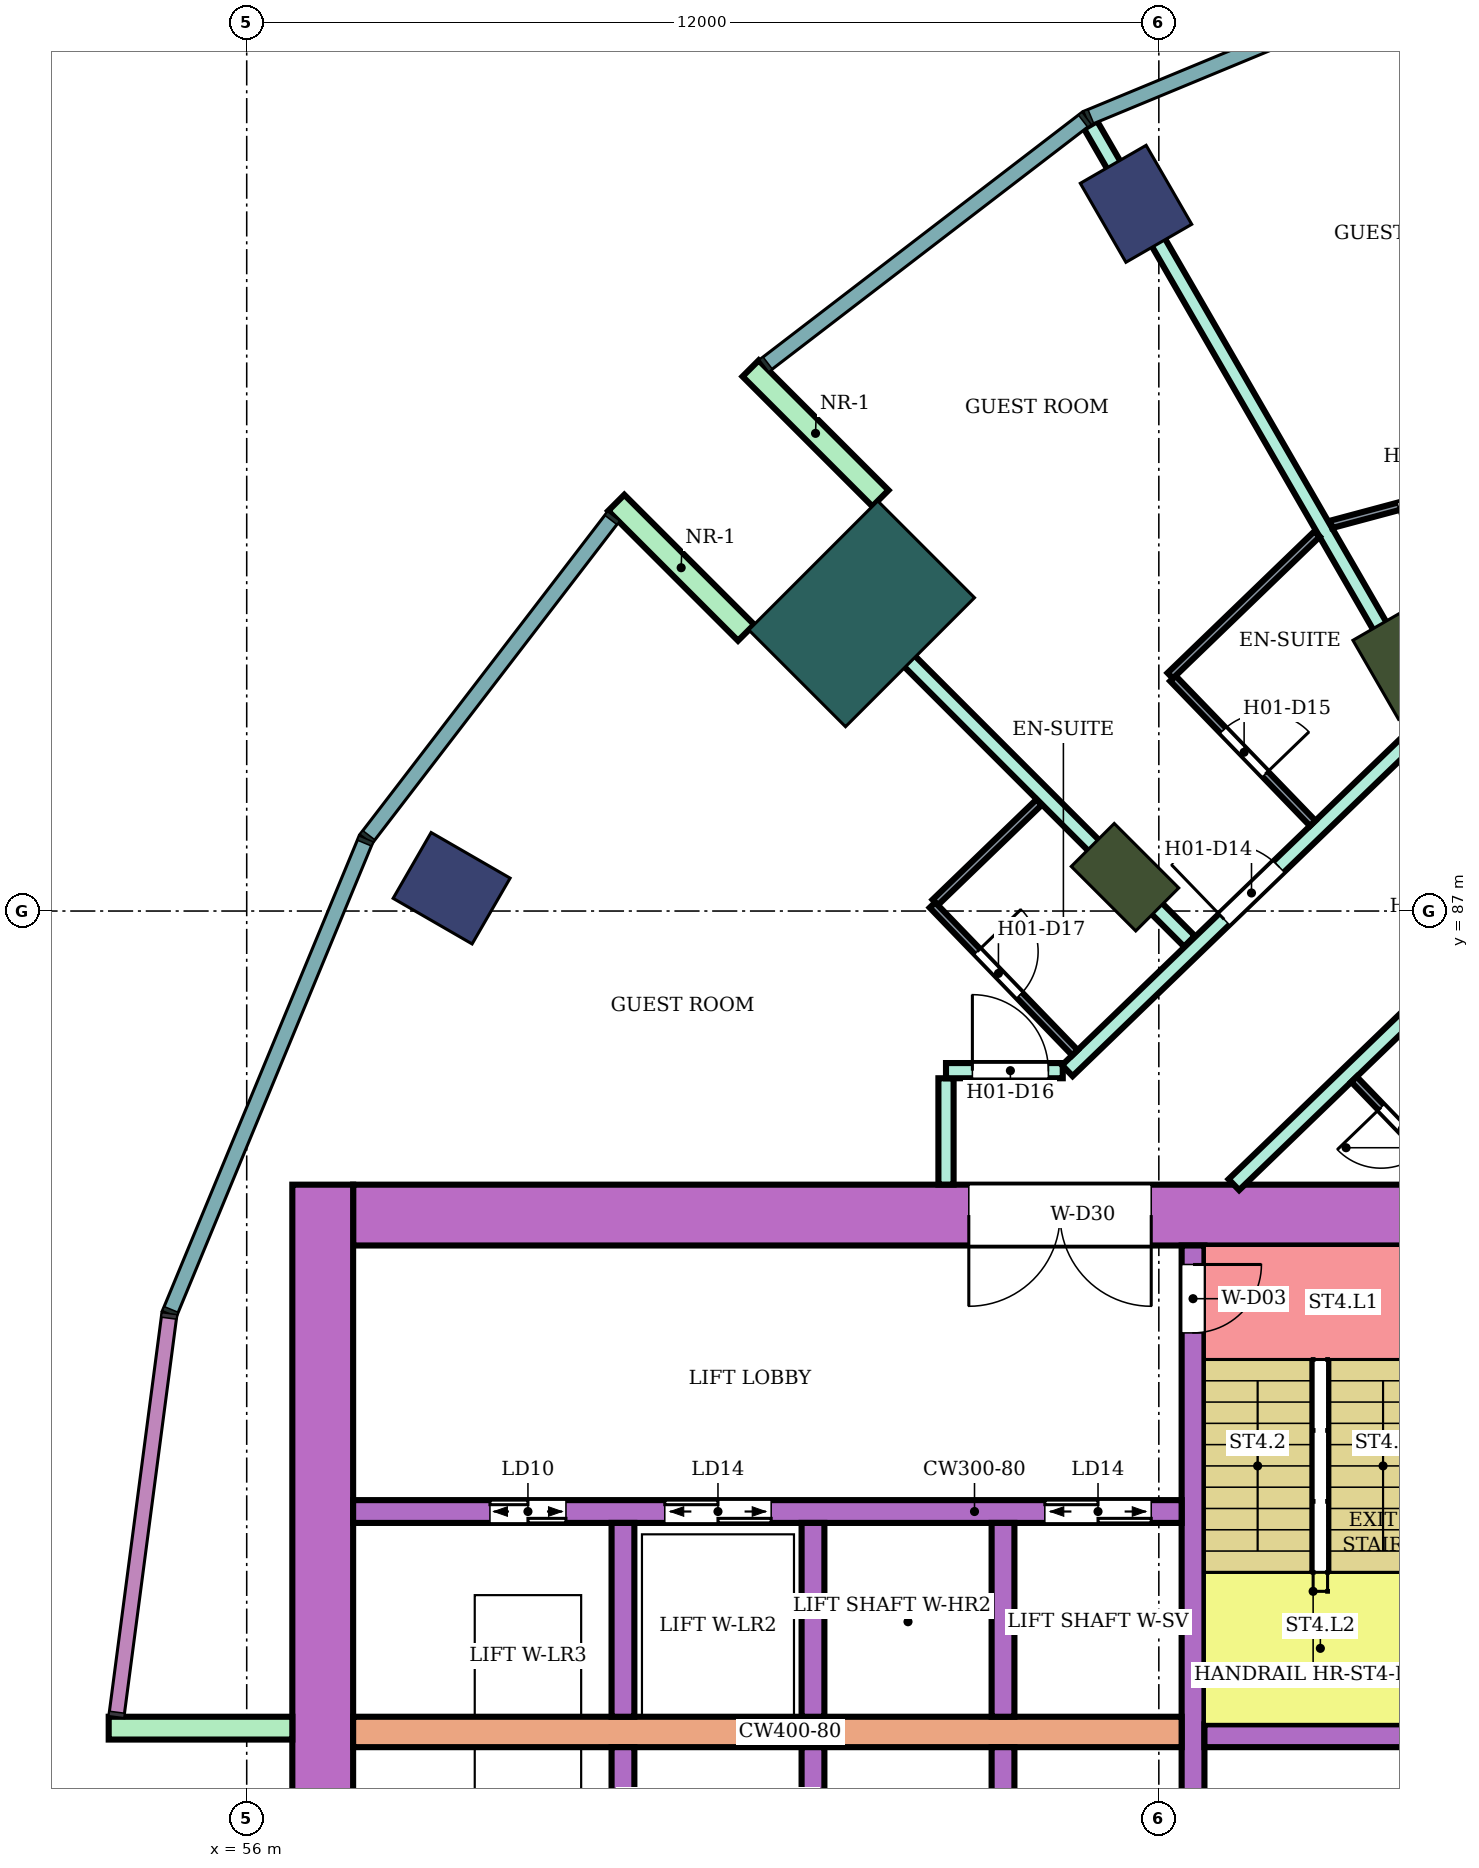
"""IFC4 building model, lengths in metres.
Left out: names, types, materials, properties, quantities, classifications, styles, units other than length and angle.
Written with IfcOpenShell. Run it as: python <this file> out.ifc"""

import sys

from ifc_helpers import new_model, si_unit, direction, frame, frame_2d, origin, origin_2d, place, context, subcontext, project, spatial, rectangle, extrude, element, fill, save


model = new_model("IFC4")
c1 = context("Model", 3, precision=1e-05, world=origin(), true_north=direction((0.0, 1.0)))
c2 = subcontext(c1, "Body", "Model", "MODEL_VIEW")
j1 = project(units=[si_unit("LENGTHUNIT", "METRE"), si_unit("PLANEANGLEUNIT", "RADIAN")], contexts=[c1])
p1 = place(None, origin())
s1 = spatial("IfcSite", under=j1, at=p1, CompositionType="ELEMENT")
p2 = place(p1, origin())
s2 = spatial("IfcBuilding", under=s1, at=p2, CompositionType="ELEMENT")
p3 = place(p2, frame((0.0, 0.0, 32.6)))
s3 = spatial("IfcBuildingStorey", under=s2, at=p3, CompositionType="ELEMENT", Elevation=32.6)
for number, where, z_axis, x_axis in (
    (1, (67.7, 96.304, 0.0), (0.0, 0.0, 1.0), (-0.5, 0.866, 0.0)),
    (2, (58.696, 87.3, 0.0), (0.0, 0.0, 1.0), (-0.866, 0.5, 0.0)),
):
    element("IfcColumn", number, at=place(p3, frame(where, z_axis=z_axis, x_axis=x_axis)), inside=s3, PredefinedType="COLUMN", context=c2, shape_type="SweptSolid", body=[
        extrude(rectangle(XDim=1.2, YDim=1.0, at=origin_2d()), origin(), (0.0, 0.0, 1.0), 3.8),
    ])
for number, where, z_axis, x_axis in (
    (3, (71.2, 90.242, 0.0), (0.0, 0.0, 1.0), (-0.5, 0.866, 0.0)),
    (4, (67.555, 87.445, 0.0), (0.0, 0.0, 1.0), (-0.707, 0.707, 0.0)),
):
    element("IfcColumn", number, at=place(p3, frame(where, z_axis=z_axis, x_axis=x_axis)), inside=s3, PredefinedType="COLUMN", context=c2, shape_type="SweptSolid", body=[
        extrude(rectangle(XDim=1.2, YDim=0.8, at=origin_2d()), origin(), (0.0, 0.0, 1.0), 3.8),
    ])
p4 = place(p3, frame((64.09, 90.91, 0.0), z_axis=(0.0, 0.0, 1.0), x_axis=(-0.707106781187, 0.707106781187, 0.0)))
e5 = element("IfcColumn", 5, at=p4, inside=s3, PredefinedType="COLUMN", context=c2, shape_type="SweptSolid", body=[
    extrude(rectangle(XDim=1.8, YDim=2.4, at=origin_2d()), origin(), (0.0, 0.0, 1.0), 3.8),
])
p5 = place(p3, frame((72.1, 83.0, 0.0), z_axis=(0.0, 0.0, 1.0), x_axis=(-1.0, 0.0, 0.0)))
e6 = element("IfcWall", 6, at=p5, inside=s3, PredefinedType="SHEAR", context=c2, shape_type="SweptSolid", body=[
    extrude(rectangle(XDim=14.7, YDim=0.8, at=frame_2d((7.35, 0.0))), origin(), (0.0, 0.0, 1.0), 3.48),
])
p6 = place(p5, frame((4.2, 0.0, 0.0)))
e7 = element("IfcOpeningElement", 7, at=p6, cuts=e6, PredefinedType="OPENING", context=c2, shape_type="SweptSolid", body=[
    extrude(rectangle(XDim=2.4, YDim=2.4, at=frame_2d((1.2, 1.2))), frame((0.0, 0.41, 0.0), z_axis=(0.0, -1.0, 0.0), x_axis=(1.0, 0.0, 0.0)), (0.0, 0.0, 1.0), 0.82),
])
p7 = place(p3, frame((57.0, 83.4, 0.0), z_axis=(0.0, 0.0, 1.0), x_axis=(0.0, -1.0, 0.0)))
e8 = element("IfcWall", 8, at=p7, inside=s3, PredefinedType="SHEAR", context=c2, shape_type="SweptSolid", body=[
    extrude(rectangle(XDim=16.8, YDim=0.8, at=frame_2d((8.4, 0.0))), origin(), (0.0, 0.0, 1.0), 3.48),
])
p8 = place(p3, frame((68.45, 82.6, 0.0), z_axis=(0.0, 0.0, 1.0), x_axis=(0.0, -1.0, 0.0)))
e9 = element("IfcWall", 9, at=p8, inside=s3, PredefinedType="SHEAR", context=c2, shape_type="SweptSolid", body=[
    extrude(rectangle(XDim=7.6, YDim=0.3, at=frame_2d((3.8, 0.0))), origin(), (0.0, 0.0, 1.0), 3.48),
])
p9 = place(p8, frame((0.25, 0.0, 0.0)))
e10 = element("IfcOpeningElement", 10, at=p9, cuts=e9, PredefinedType="OPENING", context=c2, shape_type="SweptSolid", body=[
    extrude(rectangle(XDim=0.9, YDim=2.1, at=frame_2d((0.45, 1.05))), frame((0.0, 0.16, 0.0), z_axis=(0.0, -1.0, 0.0), x_axis=(1.0, 0.0, 0.0)), (0.0, 0.0, 1.0), 0.32),
])
p10 = place(p3, frame((71.65, 76.15, 0.0), z_axis=(0.0, 0.0, 1.0), x_axis=(-1.0, 0.0, 0.0)))
e11 = element("IfcWall", 11, at=p10, inside=s3, PredefinedType="SHEAR", context=c2, shape_type="SweptSolid", body=[
    extrude(rectangle(XDim=3.05, YDim=0.3, at=frame_2d((1.525, 0.0))), origin(), (0.0, 0.0, 1.0), 3.48),
])
p11 = place(p3, frame((68.3, 76.2, 0.0), z_axis=(0.0, 0.0, 1.0), x_axis=(-1.0, 0.0, 0.0)))
e12 = element("IfcWall", 12, at=p11, inside=s3, PredefinedType="SHEAR", context=c2, shape_type="SweptSolid", body=[
    extrude(rectangle(XDim=10.9, YDim=0.4, at=frame_2d((5.45, 0.0))), origin(), (0.0, 0.0, 1.0), 3.48),
])
p12 = place(p3, frame((68.3, 79.1, 0.0), z_axis=(0.0, 0.0, 1.0), x_axis=(-1.0, 0.0, 0.0)))
e13 = element("IfcWall", 13, at=p12, inside=s3, PredefinedType="SHEAR", context=c2, shape_type="SweptSolid", body=[
    extrude(rectangle(XDim=10.9, YDim=0.3, at=frame_2d((5.45, 0.0))), origin(), (0.0, 0.0, 1.0), 3.48),
])
p13 = place(p12, frame((0.4, 0.0, 0.0)))
e14 = element("IfcOpeningElement", 14, at=p13, cuts=e13, PredefinedType="OPENING", context=c2, shape_type="SweptSolid", body=[
    extrude(rectangle(XDim=1.4, YDim=2.1, at=frame_2d((0.7, 1.05))), frame((0.0, 0.16, 0.0), z_axis=(0.0, -1.0, 0.0), x_axis=(1.0, 0.0, 0.0)), (0.0, 0.0, 1.0), 0.32),
])
p14 = place(p12, frame((5.4, 0.0, 0.0)))
e15 = element("IfcOpeningElement", 15, at=p14, cuts=e13, PredefinedType="OPENING", context=c2, shape_type="SweptSolid", body=[
    extrude(rectangle(XDim=1.4, YDim=2.1, at=frame_2d((0.7, 1.05))), frame((0.0, 0.16, 0.0), z_axis=(0.0, -1.0, 0.0), x_axis=(1.0, 0.0, 0.0)), (0.0, 0.0, 1.0), 0.32),
])
p15 = place(p12, frame((8.1, 0.0, 0.0)))
e16 = element("IfcOpeningElement", 16, at=p15, cuts=e13, PredefinedType="OPENING", context=c2, shape_type="SweptSolid", body=[
    extrude(rectangle(XDim=1.0, YDim=2.1, at=frame_2d((0.5, 1.05))), frame((0.0, 0.16, 0.0), z_axis=(0.0, -1.0, 0.0), x_axis=(1.0, 0.0, 0.0)), (0.0, 0.0, 1.0), 0.32),
])
for number, where, z_axis, x_axis in (
    (17, (65.95, 76.0, 0.0), (0.0, 0.0, 1.0), (0.0, -1.0, 0.0)),
    (18, (63.45, 76.0, 0.0), (0.0, 0.0, 1.0), (0.0, -1.0, 0.0)),
    (19, (60.95, 76.0, 0.0), (0.0, 0.0, 1.0), (0.0, -1.0, 0.0)),
    (20, (65.95, 78.95, 0.0), (0.0, 0.0, 1.0), (0.0, -1.0, 0.0)),
    (21, (63.45, 78.95, 0.0), (0.0, 0.0, 1.0), (0.0, -1.0, 0.0)),
    (22, (60.95, 78.95, 0.0), (0.0, 0.0, 1.0), (0.0, -1.0, 0.0)),
):
    element("IfcWall", number, at=place(p3, frame(where, z_axis=z_axis, x_axis=x_axis)), inside=s3, PredefinedType="SHEAR", context=c2, shape_type="SweptSolid", body=[
        extrude(rectangle(XDim=2.55, YDim=0.3, at=frame_2d((1.275, 0.0))), origin(), (0.0, 0.0, 1.0), 3.48),
    ])
for number, where, z_axis, x_axis in (
    (23, (64.338, 92.43, 0.0), (0.0, 0.0, 1.0), (-0.707, 0.707, 0.0)),
    (24, (62.57, 90.662, 0.0), (0.0, 0.0, 1.0), (-0.707, 0.707, 0.0)),
    (25, (56.6, 76.25, 0.0), (0.0, 0.0, 1.0), (-1.0, 0.0, 0.0)),
):
    element("IfcWall", number, at=place(p3, frame(where, z_axis=z_axis, x_axis=x_axis)), inside=s3, PredefinedType="NOTDEFINED", context=c2, shape_type="SweptSolid", body=[
        extrude(rectangle(XDim=2.416, YDim=0.3, at=frame_2d((1.208, 0.0))), origin(), (0.0, 0.0, 1.0), 3.8),
    ])
p16 = place(p3, frame((63.599, 91.408, 0.0), z_axis=(0.0, 0.0, 1.0), x_axis=(0.706981017422, -0.707232522587, 0.0)))
e26 = element("IfcWall", 26, at=p16, inside=s3, PredefinedType="PARTITIONING", context=c2, shape_type="SweptSolid", body=[
    extrude(rectangle(XDim=6.795, YDim=0.2, at=frame_2d((3.397, 0.0))), origin(), (0.0, 0.0, 1.0), 3.35),
])
p17 = place(p3, frame((65.2, 83.401, 0.0), z_axis=(0.0, 0.0, 1.0), x_axis=(0.0, 1.0, 0.0)))
e27 = element("IfcWall", 27, at=p17, inside=s3, PredefinedType="PARTITIONING", context=c2, shape_type="SweptSolid", body=[
    extrude(rectangle(XDim=1.399, YDim=0.2, at=frame_2d((0.7, 0.0))), origin(), (0.0, 0.0, 1.0), 3.35),
])
p18 = place(p3, frame((65.2, 84.9, 0.0), z_axis=(0.0, 0.0, 1.0), x_axis=(1.0, 0.0, 0.0)))
e28 = element("IfcWall", 28, at=p18, inside=s3, PredefinedType="PARTITIONING", context=c2, shape_type="SweptSolid", body=[
    extrude(rectangle(XDim=1.536, YDim=0.2, at=frame_2d((0.768, 0.0))), origin(), (0.0, 0.0, 1.0), 3.35),
])
p19 = place(p18, frame((0.347, 0.0, 0.0)))
e29 = element("IfcOpeningElement", 29, at=p19, cuts=e28, PredefinedType="OPENING", context=c2, shape_type="SweptSolid", body=[
    extrude(rectangle(XDim=1.0, YDim=2.1, at=frame_2d((0.5, 1.05))), frame((0.0, 0.11, 0.0), z_axis=(0.0, -1.0, 0.0), x_axis=(1.0, 0.0, 0.0)), (0.0, 0.0, 1.0), 0.22),
])
p20 = place(p3, frame((66.796, 84.9, 0.0), z_axis=(0.0, 0.0, 1.0), x_axis=(0.719690131178, 0.694295409092, 0.0)))
e30 = element("IfcWall", 30, at=p20, inside=s3, PredefinedType="PARTITIONING", context=c2, shape_type="SweptSolid", body=[
    extrude(rectangle(XDim=6.585, YDim=0.2, at=frame_2d((3.293, 0.0))), origin(), (0.0, 0.0, 1.0), 3.35),
])
p21 = place(p20, frame((2.867, 0.0, 0.0)))
e31 = element("IfcOpeningElement", 31, at=p21, cuts=e30, PredefinedType="OPENING", context=c2, shape_type="SweptSolid", body=[
    extrude(rectangle(XDim=1.0, YDim=2.1, at=frame_2d((0.5, 1.05))), frame((0.0, 0.11, 0.0), z_axis=(0.0, -1.0, 0.0), x_axis=(1.0, 0.0, 0.0)), (0.0, 0.0, 1.0), 0.22),
])
p22 = place(p3, frame((67.102, 97.342, 0.0), z_axis=(0.0, 0.0, 1.0), x_axis=(0.499944680089, -0.866057340394, 0.0)))
e32 = element("IfcWall", 32, at=p22, inside=s3, PredefinedType="PARTITIONING", context=c2, shape_type="SweptSolid", body=[
    extrude(rectangle(XDim=8.908, YDim=0.2, at=frame_2d((4.454, 0.0))), origin(), (0.0, 0.0, 1.0), 3.35),
])
p23 = place(p3, frame((68.987, 83.4, 0.0), z_axis=(0.0, 0.0, 1.0), x_axis=(0.719591503389, 0.694397629784, 0.0)))
e33 = element("IfcWall", 33, at=p23, inside=s3, PredefinedType="PARTITIONING", context=c2, shape_type="SweptSolid", body=[
    extrude(rectangle(XDim=5.378, YDim=0.2, at=frame_2d((2.689, 0.0))), origin(), (0.0, 0.0, 1.0), 3.35),
])
p24 = place(p23, frame((3.938, 0.0, 0.0)))
e34 = element("IfcOpeningElement", 34, at=p24, cuts=e33, PredefinedType="OPENING", context=c2, shape_type="SweptSolid", body=[
    extrude(rectangle(XDim=1.0, YDim=2.1, at=frame_2d((0.5, 1.05))), frame((0.0, 0.11, 0.0), z_axis=(0.0, -1.0, 0.0), x_axis=(1.0, 0.0, 0.0)), (0.0, 0.0, 1.0), 0.22),
])
p25 = place(p3, frame((65.058, 87.114, 0.0), z_axis=(0.0, 0.0, 1.0), x_axis=(0.719715847356, 0.694268751324, 0.0)))
e35 = element("IfcWall", 35, at=p25, inside=s3, PredefinedType="PARTITIONING", context=c2, shape_type="SweptSolid", body=[
    extrude(rectangle(XDim=1.9, YDim=0.1, at=frame_2d((0.95, 0.0))), origin(), (0.0, 0.0, 1.0), 3.35),
])
p26 = place(p3, frame((65.022, 87.079, 0.0), z_axis=(0.0, 0.0, 1.0), x_axis=(0.694287838235, -0.719697434815, 0.0)))
e36 = element("IfcWall", 36, at=p26, inside=s3, PredefinedType="PARTITIONING", context=c2, shape_type="SweptSolid", body=[
    extrude(rectangle(XDim=2.7, YDim=0.1, at=frame_2d((1.35, 0.0))), origin(), (0.0, 0.0, 1.0), 3.35),
])
p27 = place(p26, frame((0.85, 0.0, 0.0)))
e37 = element("IfcOpeningElement", 37, at=p27, cuts=e36, PredefinedType="OPENING", context=c2, shape_type="SweptSolid", body=[
    extrude(rectangle(XDim=0.8, YDim=2.1, at=frame_2d((0.4, 1.05))), frame((0.0, 0.06, 0.0), z_axis=(0.0, -1.0, 0.0), x_axis=(1.0, 0.0, 0.0)), (0.0, 0.0, 1.0), 0.12),
])
p28 = place(p3, frame((68.185, 90.06, 0.0), z_axis=(0.0, 0.0, 1.0), x_axis=(0.69446127412, -0.719530081892, 0.0)))
e38 = element("IfcWall", 38, at=p28, inside=s3, PredefinedType="PARTITIONING", context=c2, shape_type="SweptSolid", body=[
    extrude(rectangle(XDim=2.649, YDim=0.1, at=frame_2d((1.324, 0.0))), origin(), (0.0, 0.0, 1.0), 3.35),
])
p29 = place(p28, frame((0.95, 0.0, 0.0)))
e39 = element("IfcOpeningElement", 39, at=p29, cuts=e38, PredefinedType="OPENING", context=c2, shape_type="SweptSolid", body=[
    extrude(rectangle(XDim=0.8, YDim=2.1, at=frame_2d((0.4, 1.05))), frame((0.0, 0.06, 0.0), z_axis=(0.0, -1.0, 0.0), x_axis=(1.0, 0.0, 0.0)), (0.0, 0.0, 1.0), 0.12),
])
p30 = place(p3, frame((68.15, 90.096, 0.0), z_axis=(0.0, 0.0, 1.0), x_axis=(0.719669144226, 0.694317163009, 0.0)))
e40 = element("IfcWall", 40, at=p30, inside=s3, PredefinedType="PARTITIONING", context=c2, shape_type="SweptSolid", body=[
    extrude(rectangle(XDim=2.687, YDim=0.1, at=frame_2d((1.343, 0.0))), origin(), (0.0, 0.0, 1.0), 3.35),
])
p31 = place(p3, frame((70.268, 92.087, 0.0), z_axis=(0.0, 0.0, 1.0), x_axis=(0.965931867509, 0.258796497911, 0.0)))
e41 = element("IfcWall", 41, at=p31, inside=s3, PredefinedType="PARTITIONING", context=c2, shape_type="SweptSolid", body=[
    extrude(rectangle(XDim=2.693, YDim=0.1, at=frame_2d((1.347, 0.0))), origin(), (0.0, 0.0, 1.0), 3.35),
])
p32 = place(p31, frame((0.912, 0.0, 0.0)))
e42 = element("IfcOpeningElement", 42, at=p32, cuts=e41, PredefinedType="OPENING", context=c2, shape_type="SweptSolid", body=[
    extrude(rectangle(XDim=0.8, YDim=2.1, at=frame_2d((0.4, 1.05))), frame((0.0, 0.06, 0.0), z_axis=(0.0, -1.0, 0.0), x_axis=(1.0, 0.0, 0.0)), (0.0, 0.0, 1.0), 0.12),
])
p33 = place(p3, frame((70.567, 84.786, 0.0), z_axis=(0.0, 0.0, 1.0), x_axis=(0.694447472534, -0.719543402368, 0.0)))
e43 = element("IfcWall", 43, at=p33, inside=s3, PredefinedType="PARTITIONING", context=c2, shape_type="SweptSolid", body=[
    extrude(rectangle(XDim=1.926, YDim=0.1, at=frame_2d((0.963, 0.0))), origin(), (0.0, 0.0, 1.0), 3.35),
])
p34 = place(p33, frame((0.513, 0.0, 0.0)))
e44 = element("IfcOpeningElement", 44, at=p34, cuts=e43, PredefinedType="OPENING", context=c2, shape_type="SweptSolid", body=[
    extrude(rectangle(XDim=0.8, YDim=2.1, at=frame_2d((0.4, 1.05))), frame((0.0, 0.06, 0.0), z_axis=(0.0, -1.0, 0.0), x_axis=(1.0, 0.0, 0.0)), (0.0, 0.0, 1.0), 0.12),
])
p35 = place(p32, frame((0.8, 0.0, 0.0), z_axis=(0.0, 0.0, 1.0), x_axis=(-1.0, 0.0, 0.0)))
e45 = element("IfcDoor", 45, at=p35, inside=s3, OperationType="SINGLE_SWING_RIGHT", PredefinedType="DOOR", context=c2, shape_type="SweptSolid", body=[
    extrude(rectangle(XDim=0.8, YDim=2.1, at=frame_2d((0.4, 1.05))), frame((0.0, 0.025, 0.0), z_axis=(0.0, -1.0, 0.0), x_axis=(1.0, 0.0, 0.0)), (0.0, 0.0, 1.0), 0.05),
])
fill(e42, e45)
p36 = place(p21, origin())
e46 = element("IfcDoor", 46, at=p36, inside=s3, OperationType="SINGLE_SWING_LEFT", PredefinedType="DOOR", context=c2, shape_type="SweptSolid", body=[
    extrude(rectangle(XDim=1.0, YDim=2.1, at=frame_2d((0.5, 1.05))), frame((0.0, 0.025, 0.0), z_axis=(0.0, -1.0, 0.0), x_axis=(1.0, 0.0, 0.0)), (0.0, 0.0, 1.0), 0.05),
])
fill(e31, e46)
p37 = place(p29, origin())
e47 = element("IfcDoor", 47, at=p37, inside=s3, OperationType="SINGLE_SWING_RIGHT", PredefinedType="DOOR", context=c2, shape_type="SweptSolid", body=[
    extrude(rectangle(XDim=0.8, YDim=2.1, at=frame_2d((0.4, 1.05))), frame((0.0, 0.025, 0.0), z_axis=(0.0, -1.0, 0.0), x_axis=(1.0, 0.0, 0.0)), (0.0, 0.0, 1.0), 0.05),
])
fill(e39, e47)
p38 = place(p19, origin())
e48 = element("IfcDoor", 48, at=p38, inside=s3, OperationType="SINGLE_SWING_LEFT", PredefinedType="DOOR", context=c2, shape_type="SweptSolid", body=[
    extrude(rectangle(XDim=1.0, YDim=2.1, at=frame_2d((0.5, 1.05))), frame((0.0, 0.025, 0.0), z_axis=(0.0, -1.0, 0.0), x_axis=(1.0, 0.0, 0.0)), (0.0, 0.0, 1.0), 0.05),
])
fill(e29, e48)
p39 = place(p27, origin())
e49 = element("IfcDoor", 49, at=p39, inside=s3, OperationType="SINGLE_SWING_LEFT", PredefinedType="DOOR", context=c2, shape_type="SweptSolid", body=[
    extrude(rectangle(XDim=0.8, YDim=2.1, at=frame_2d((0.4, 1.05))), frame((0.0, 0.025, 0.0), z_axis=(0.0, -1.0, 0.0), x_axis=(1.0, 0.0, 0.0)), (0.0, 0.0, 1.0), 0.05),
])
fill(e37, e49)
p40 = place(p34, frame((0.8, 0.0, 0.0), z_axis=(0.0, 0.0, 1.0), x_axis=(-1.0, 0.0, 0.0)))
e50 = element("IfcDoor", 50, at=p40, inside=s3, OperationType="SINGLE_SWING_RIGHT", PredefinedType="DOOR", context=c2, shape_type="SweptSolid", body=[
    extrude(rectangle(XDim=0.8, YDim=2.1, at=frame_2d((0.4, 1.05))), frame((0.0, 0.025, 0.0), z_axis=(0.0, -1.0, 0.0), x_axis=(1.0, 0.0, 0.0)), (0.0, 0.0, 1.0), 0.05),
])
fill(e44, e50)
p41 = place(p9, origin())
e51 = element("IfcDoor", 51, at=p41, inside=s3, OperationType="SINGLE_SWING_LEFT", PredefinedType="DOOR", context=c2, shape_type="SweptSolid", body=[
    extrude(rectangle(XDim=0.9, YDim=2.1, at=frame_2d((0.45, 1.05))), frame((0.0, 0.025, 0.0), z_axis=(0.0, -1.0, 0.0), x_axis=(1.0, 0.0, 0.0)), (0.0, 0.0, 1.0), 0.05),
])
fill(e10, e51)
p42 = place(p13, origin())
e52 = element("IfcDoor", 52, at=p42, inside=s3, OperationType="DOUBLE_DOOR_SLIDING", PredefinedType="DOOR", context=c2, shape_type="SweptSolid", body=[
    extrude(rectangle(XDim=1.4, YDim=2.1, at=frame_2d((0.7, 1.05))), frame((0.0, 0.025, 0.0), z_axis=(0.0, -1.0, 0.0), x_axis=(1.0, 0.0, 0.0)), (0.0, 0.0, 1.0), 0.05),
])
fill(e14, e52)
p43 = place(p14, origin())
e53 = element("IfcDoor", 53, at=p43, inside=s3, OperationType="DOUBLE_DOOR_SLIDING", PredefinedType="DOOR", context=c2, shape_type="SweptSolid", body=[
    extrude(rectangle(XDim=1.4, YDim=2.1, at=frame_2d((0.7, 1.05))), frame((0.0, 0.025, 0.0), z_axis=(0.0, -1.0, 0.0), x_axis=(1.0, 0.0, 0.0)), (0.0, 0.0, 1.0), 0.05),
])
fill(e15, e53)
p44 = place(p15, origin())
e54 = element("IfcDoor", 54, at=p44, inside=s3, OperationType="DOUBLE_DOOR_SLIDING", PredefinedType="DOOR", context=c2, shape_type="SweptSolid", body=[
    extrude(rectangle(XDim=1.0, YDim=2.1, at=frame_2d((0.5, 1.05))), frame((0.0, 0.025, 0.0), z_axis=(0.0, -1.0, 0.0), x_axis=(1.0, 0.0, 0.0)), (0.0, 0.0, 1.0), 0.05),
])
fill(e16, e54)
p45 = place(p6, origin())
e55 = element("IfcDoor", 55, at=p45, inside=s3, OperationType="DOUBLE_DOOR_SINGLE_SWING", PredefinedType="DOOR", context=c2, shape_type="SweptSolid", body=[
    extrude(rectangle(XDim=2.4, YDim=2.4, at=frame_2d((1.2, 1.2))), frame((0.0, 0.025, 0.0), z_axis=(0.0, -1.0, 0.0), x_axis=(1.0, 0.0, 0.0)), (0.0, 0.0, 1.0), 0.05),
])
fill(e7, e55)
save(model, sys.argv[1])
